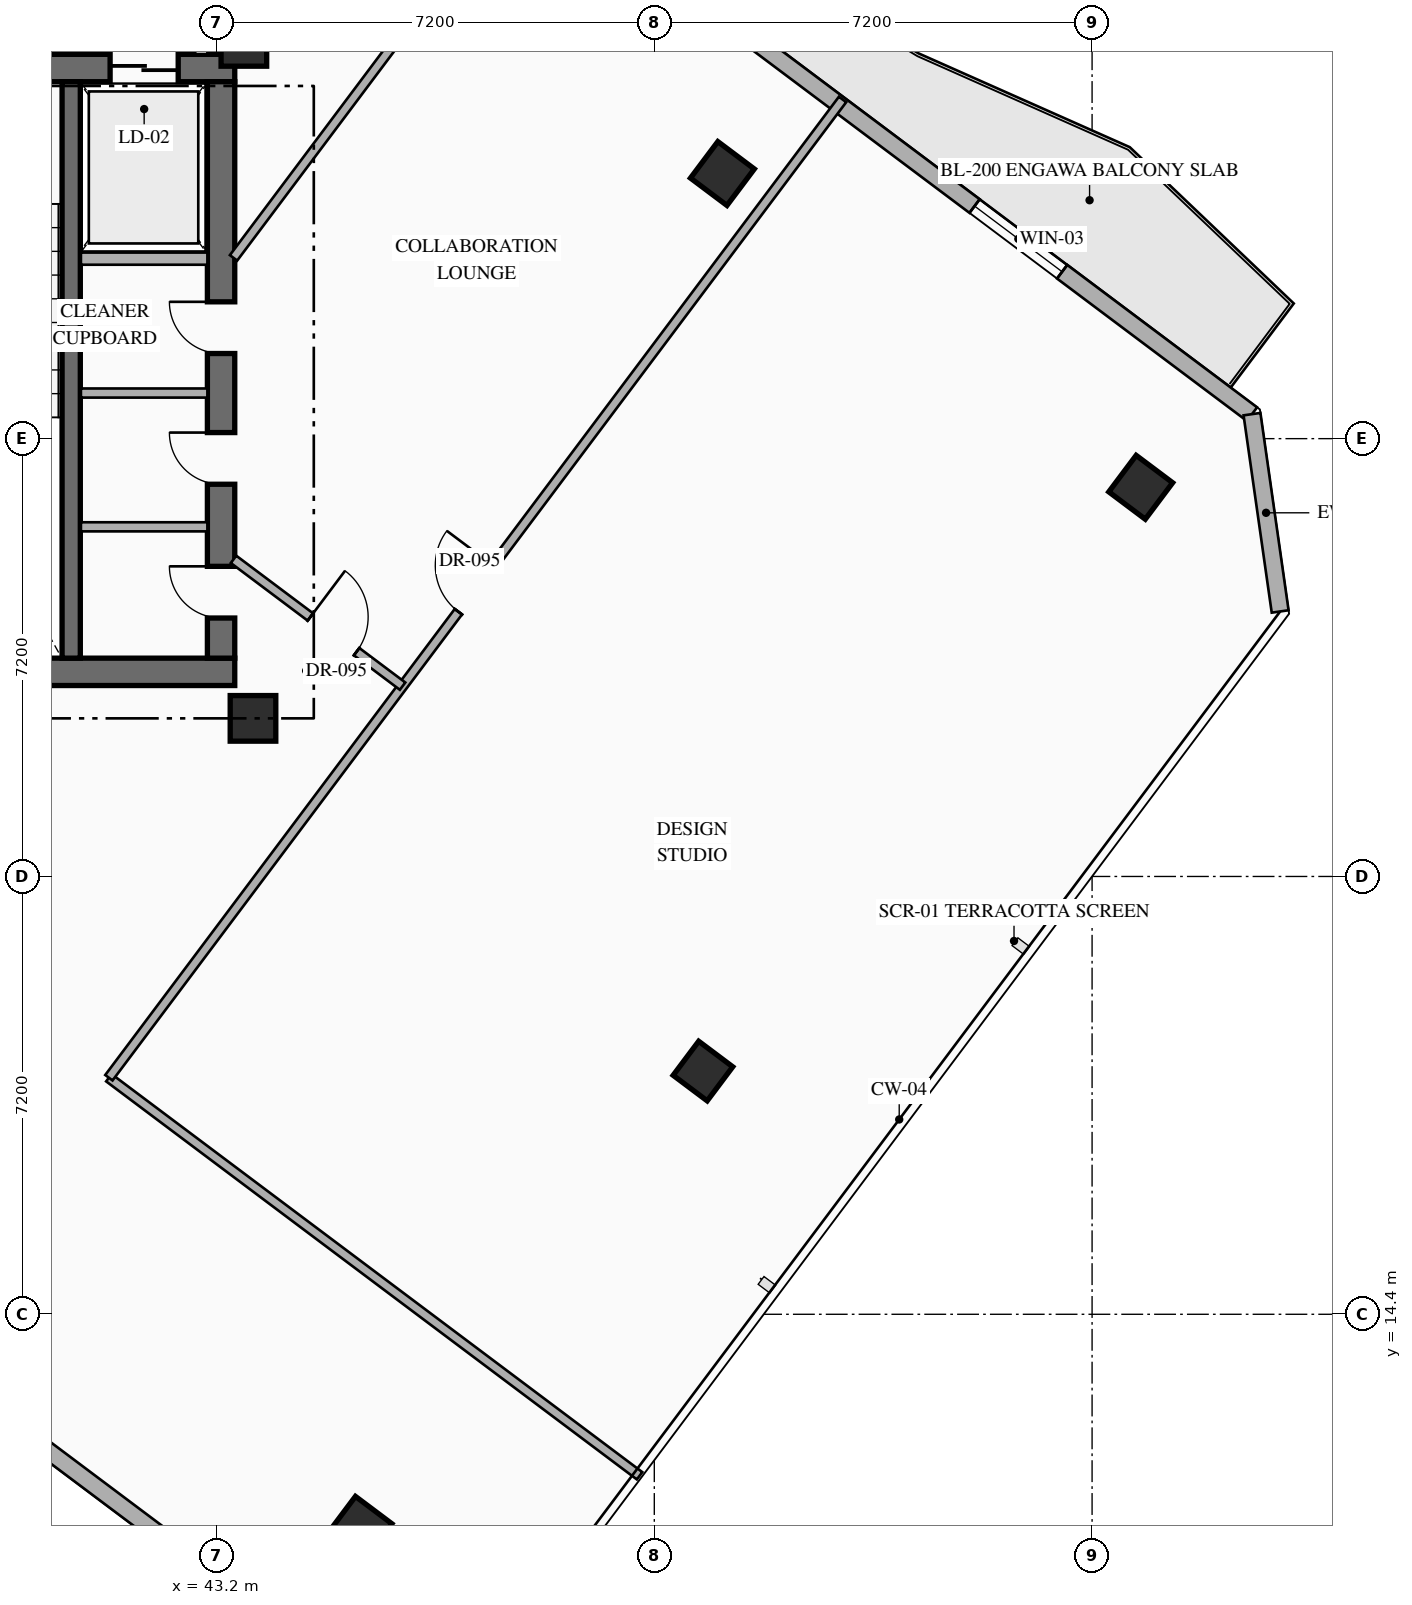
"""IFC4 building model, lengths in metres.
Left out: names, types, materials, properties, quantities, classifications, styles, units other than length and angle.
Written with IfcOpenShell. Run it as: python <this file> out.ifc"""

import sys

from ifc_helpers import new_model, si_unit, direction, frame, frame_2d, origin, origin_2d, place, context, subcontext, project, spatial, rectangle, hollow_rectangle, extrude, element, fill, save


model = new_model("IFC4")
c1 = context("Model", 3, precision=1e-05, world=origin(), true_north=direction((0.0, 1.0)))
c2 = subcontext(c1, "Body", "Model", "MODEL_VIEW")
j1 = project(units=[si_unit("LENGTHUNIT", "METRE"), si_unit("PLANEANGLEUNIT", "RADIAN")], contexts=[c1])
p1 = place(None, origin())
s1 = spatial("IfcSite", under=j1, at=p1, CompositionType="ELEMENT")
p2 = place(p1, origin())
s2 = spatial("IfcBuilding", under=s1, at=p2, CompositionType="ELEMENT")
p3 = place(p2, frame((0.0, 0.0, 205.95)))
s3 = spatial("IfcBuildingStorey", under=s2, at=p3, CompositionType="ELEMENT", Elevation=205.95)
p4 = place(p3, frame((36.04, 24.965, 0.0), z_axis=(0.0, 0.0, 1.0), x_axis=(1.0, 0.0, 0.0)))
e1 = element("IfcWall", 1, at=p4, inside=s3, PredefinedType="SHEAR", context=c2, shape_type="SweptSolid", body=[
    extrude(rectangle(XDim=7.46, YDim=0.45, at=frame_2d((3.73, 0.0))), origin(), (0.0, 0.0, 1.0), 3.6),
])
p5 = place(p3, frame((36.04, 34.895, 0.0), z_axis=(0.0, 0.0, 1.0), x_axis=(1.0, 0.0, 0.0)))
e2 = element("IfcWall", 2, at=p5, inside=s3, PredefinedType="SHEAR", context=c2, shape_type="SweptSolid", body=[
    extrude(rectangle(XDim=7.46, YDim=0.45, at=frame_2d((3.73, 0.0))), origin(), (0.0, 0.0, 1.0), 3.6),
])
p6 = place(p5, frame((2.51, 0.0, 0.0)))
e3 = element("IfcOpeningElement", 3, at=p6, cuts=e2, PredefinedType="OPENING", context=c2, shape_type="SweptSolid", body=[
    extrude(rectangle(XDim=1.1, YDim=2.2, at=frame_2d((0.55, 1.1))), frame((0.0, 0.235, 0.0), z_axis=(0.0, -1.0, 0.0), x_axis=(1.0, 0.0, 0.0)), (0.0, 0.0, 1.0), 0.47),
])
p7 = place(p5, frame((5.41, 0.0, 0.0)))
e4 = element("IfcOpeningElement", 4, at=p7, cuts=e2, PredefinedType="OPENING", context=c2, shape_type="SweptSolid", body=[
    extrude(rectangle(XDim=1.12, YDim=2.15, at=frame_2d((0.56, 1.075))), frame((0.0, 0.235, 0.0), z_axis=(0.0, -1.0, 0.0), x_axis=(1.0, 0.0, 0.0)), (0.0, 0.0, 1.0), 0.47),
])
p8 = place(p3, frame((43.275, 25.19, 0.0), z_axis=(0.0, 0.0, 1.0), x_axis=(0.0, 1.0, 0.0)))
e5 = element("IfcWall", 5, at=p8, inside=s3, PredefinedType="SHEAR", context=c2, shape_type="SweptSolid", body=[
    extrude(rectangle(XDim=9.48, YDim=0.45, at=frame_2d((4.74, 0.0))), origin(), (0.0, 0.0, 1.0), 3.6),
])
p9 = place(p8, frame((0.66, 0.0, 0.0)))
e6 = element("IfcOpeningElement", 6, at=p9, cuts=e5, PredefinedType="OPENING", context=c2, shape_type="SweptSolid", body=[
    extrude(rectangle(XDim=0.85, YDim=2.08, at=frame_2d((0.425, 1.04))), frame((0.0, 0.235, 0.0), z_axis=(0.0, -1.0, 0.0), x_axis=(1.0, 0.0, 0.0)), (0.0, 0.0, 1.0), 0.47),
])
p10 = place(p8, frame((2.86, 0.0, 0.0)))
e7 = element("IfcOpeningElement", 7, at=p10, cuts=e5, PredefinedType="OPENING", context=c2, shape_type="SweptSolid", body=[
    extrude(rectangle(XDim=0.85, YDim=2.08, at=frame_2d((0.425, 1.04))), frame((0.0, 0.235, 0.0), z_axis=(0.0, -1.0, 0.0), x_axis=(1.0, 0.0, 0.0)), (0.0, 0.0, 1.0), 0.47),
])
p11 = place(p8, frame((5.01, 0.0, 0.0)))
e8 = element("IfcOpeningElement", 8, at=p11, cuts=e5, PredefinedType="OPENING", context=c2, shape_type="SweptSolid", body=[
    extrude(rectangle(XDim=0.85, YDim=2.08, at=frame_2d((0.425, 1.04))), frame((0.0, 0.235, 0.0), z_axis=(0.0, -1.0, 0.0), x_axis=(1.0, 0.0, 0.0)), (0.0, 0.0, 1.0), 0.47),
])
p12 = place(p3, frame((40.81, 25.19, 0.0), z_axis=(0.0, 0.0, 1.0), x_axis=(0.0, 1.0, 0.0)))
e9 = element("IfcWall", 9, at=p12, inside=s3, PredefinedType="SHEAR", context=c2, shape_type="SweptSolid", body=[
    extrude(rectangle(XDim=9.48, YDim=0.3, at=frame_2d((4.74, 0.0))), origin(), (0.0, 0.0, 1.0), 3.6),
])
for number, where, z_axis, x_axis in (
    (10, (43.8, 24.2, 0.0), (0.0, 0.0, 1.0), (1.0, 0.0, 0.0)),
    (11, (43.65, 35.3, 0.0), (0.0, 0.0, 1.0), (1.0, 0.0, 0.0)),
    (12, (51.52, 33.16, 0.0), (0.0, 0.0, 1.0), (0.8, -0.6, 0.0)),
    (13, (45.56, 10.88, 0.0), (0.0, 0.0, 1.0), (0.8, -0.6, 0.0)),
    (14, (58.4, 28.0, 0.0), (0.0, 0.0, 1.0), (0.8, -0.6, 0.0)),
):
    element("IfcColumn", number, at=place(p3, frame(where, z_axis=z_axis, x_axis=x_axis)), inside=s3, PredefinedType="COLUMN", context=c2, shape_type="SweptSolid", body=[
        extrude(hollow_rectangle(XDim=0.75, YDim=0.75, WallThickness=0.028, at=origin_2d()), origin(), (0.0, 0.0, 1.0), 3.6),
    ])
p13 = place(p3, frame((51.2, 18.4, 0.0), z_axis=(0.0, 0.0, 1.0), x_axis=(0.799999996291, -0.600000004945, 0.0)))
e15 = element("IfcColumn", 15, at=p13, inside=s3, PredefinedType="COLUMN", context=c2, shape_type="SweptSolid", body=[
    extrude(hollow_rectangle(XDim=0.7, YDim=0.7, WallThickness=0.028, at=origin_2d()), origin(), (0.0, 0.0, 1.0), 3.6),
])
p14 = place(p3, frame((44.86, 40.73, 0.0), z_axis=(0.0, 0.0, 1.0), x_axis=(0.800007624502, -0.599989833863, 0.0)))
e16 = element("IfcWall", 16, at=p14, inside=s3, PredefinedType="STANDARD", context=c2, shape_type="SweptSolid", body=[
    extrude(rectangle(XDim=19.212, YDim=0.28, at=frame_2d((9.606, 0.0))), origin(), (0.0, 0.0, 1.0), 3.35),
])
p15 = place(p14, frame((1.755, 0.0, 0.0)))
e17 = element("IfcOpeningElement", 17, at=p15, cuts=e16, PredefinedType="OPENING", context=c2, shape_type="SweptSolid", body=[
    extrude(rectangle(XDim=1.1, YDim=2.2, at=frame_2d((0.55, 1.1))), frame((0.0, 0.15, 0.0), z_axis=(0.0, -1.0, 0.0), x_axis=(1.0, 0.0, 0.0)), (0.0, 0.0, 1.0), 0.3),
])
p16 = place(p14, frame((13.509, 0.0, 0.85)))
e18 = element("IfcOpeningElement", 18, at=p16, cuts=e16, PredefinedType="OPENING", context=c2, shape_type="SweptSolid", body=[
    extrude(rectangle(XDim=1.8, YDim=2.1, at=frame_2d((0.9, 1.05))), frame((0.0, 0.15, 0.0), z_axis=(0.0, -1.0, 0.0), x_axis=(1.0, 0.0, 0.0)), (0.0, 0.0, 1.0), 0.3),
])
p17 = place(p3, frame((60.23, 29.203, 0.0), z_axis=(0.0, 0.0, 1.0), x_axis=(0.141296221922, -0.989967361922, 0.0)))
e19 = element("IfcWall", 19, at=p17, inside=s3, PredefinedType="STANDARD", context=c2, shape_type="SweptSolid", body=[
    extrude(rectangle(XDim=3.278, YDim=0.28, at=frame_2d((1.639, 0.0))), origin(), (0.0, 0.0, 1.0), 3.35),
])
p18 = place(p3, frame((44.918, 8.787, 0.0), z_axis=(0.0, 0.0, 1.0), x_axis=(-0.800004765927, 0.599993645378, 0.0)))
e20 = element("IfcWall", 20, at=p18, inside=s3, PredefinedType="STANDARD", context=c2, shape_type="SweptSolid", body=[
    extrude(rectangle(XDim=24.588, YDim=0.28, at=frame_2d((12.294, 0.0))), origin(), (0.0, 0.0, 1.0), 3.35),
])
p19 = place(p3, frame((40.97, 31.76, 0.0), z_axis=(0.0, 0.0, 1.0), x_axis=(1.0, 0.0, 0.0)))
e21 = element("IfcWall", 21, at=p19, inside=s3, PredefinedType="STANDARD", context=c2, shape_type="SweptSolid", body=[
    extrude(rectangle(XDim=2.08, YDim=0.2, at=frame_2d((1.04, 0.0))), origin(), (0.0, 0.0, 1.0), 3.35),
])
for number, where, z_axis, x_axis in (
    (22, (40.97, 27.35, 0.0), (0.0, 0.0, 1.0), (1.0, 0.0, 0.0)),
    (23, (40.97, 29.55, 0.0), (0.0, 0.0, 1.0), (1.0, 0.0, 0.0)),
):
    element("IfcWall", number, at=place(p3, frame(where, z_axis=z_axis, x_axis=x_axis)), inside=s3, PredefinedType="PARTITIONING", context=c2, shape_type="SweptSolid", body=[
        extrude(rectangle(XDim=2.08, YDim=0.15, at=frame_2d((1.04, 0.0))), origin(), (0.0, 0.0, 1.0), 3.35),
    ])
p20 = place(p3, frame((42.95, 35.12, 0.0), z_axis=(0.0, 0.0, 1.0), x_axis=(0.0, 1.0, 0.0)))
e24 = element("IfcWall", 24, at=p20, inside=s3, PredefinedType="STANDARD", context=c2, shape_type="SweptSolid", body=[
    extrude(rectangle(XDim=2.98, YDim=0.2, at=frame_2d((1.49, 0.0))), origin(), (0.0, 0.0, 1.0), 3.35),
])
p21 = place(p3, frame((41.43, 18.29, 0.0), z_axis=(0.0, 0.0, 1.0), x_axis=(0.799994629375, -0.600007160767, 0.0)))
e25 = element("IfcWall", 25, at=p21, inside=s3, PredefinedType="PARTITIONING", context=c2, shape_type="SweptSolid", body=[
    extrude(rectangle(XDim=10.91, YDim=0.15, at=frame_2d((5.455, 0.0))), origin(), (0.0, 0.0, 1.0), 3.35),
])
p22 = place(p3, frame((41.43, 18.29, 0.0), z_axis=(0.0, 0.0, 1.0), x_axis=(0.600007769734, 0.79999417264, 0.0)))
e26 = element("IfcWall", 26, at=p22, inside=s3, PredefinedType="PARTITIONING", context=c2, shape_type="SweptSolid", body=[
    extrude(rectangle(XDim=20.11, YDim=0.15, at=frame_2d((10.055, 0.0))), origin(), (0.0, 0.0, 1.0), 3.35),
])
p23 = place(p22, frame((9.58, 0.0, 0.0)))
e27 = element("IfcOpeningElement", 27, at=p23, cuts=e26, PredefinedType="OPENING", context=c2, shape_type="SweptSolid", body=[
    extrude(rectangle(XDim=0.95, YDim=2.15, at=frame_2d((0.475, 1.075))), frame((0.0, 0.085, 0.0), z_axis=(0.0, -1.0, 0.0), x_axis=(1.0, 0.0, 0.0)), (0.0, 0.0, 1.0), 0.17),
])
p24 = place(p3, frame((43.48, 26.815, 0.0), z_axis=(0.0, 0.0, 1.0), x_axis=(0.800008430676, -0.599988758934, 0.0)))
e28 = element("IfcWall", 28, at=p24, inside=s3, PredefinedType="PARTITIONING", context=c2, shape_type="SweptSolid", body=[
    extrude(rectangle(XDim=3.475, YDim=0.15, at=frame_2d((1.738, 0.0))), origin(), (0.0, 0.0, 1.0), 3.35),
])
p25 = place(p24, frame((1.58, 0.0, 0.0)))
e29 = element("IfcOpeningElement", 29, at=p25, cuts=e28, PredefinedType="OPENING", context=c2, shape_type="SweptSolid", body=[
    extrude(rectangle(XDim=0.95, YDim=2.15, at=frame_2d((0.475, 1.075))), frame((0.0, 0.085, 0.0), z_axis=(0.0, -1.0, 0.0), x_axis=(1.0, 0.0, 0.0)), (0.0, 0.0, 1.0), 0.17),
])
p26 = place(p3, frame((43.48, 31.773, 0.0), z_axis=(0.0, 0.0, 1.0), x_axis=(0.599971041729, 0.800021717885, 0.0)))
e30 = element("IfcWall", 30, at=p26, inside=s3, PredefinedType="PARTITIONING", context=c2, shape_type="SweptSolid", body=[
    extrude(rectangle(XDim=8.094, YDim=0.15, at=frame_2d((4.047, 0.0))), origin(), (0.0, 0.0, 1.0), 3.35),
])
p27 = place(p16, origin())
e31 = element("IfcWindow", 31, at=p27, inside=s3, PartitioningType="SINGLE_PANEL", PredefinedType="WINDOW", context=c2, shape_type="SweptSolid", body=[
    extrude(rectangle(XDim=1.8, YDim=2.1, at=frame_2d((0.9, 1.05))), frame((0.0, 0.03, 0.0), z_axis=(0.0, -1.0, 0.0), x_axis=(1.0, 0.0, 0.0)), (0.0, 0.0, 1.0), 0.06),
])
fill(e18, e31)
p28 = place(p7, origin())
e32 = element("IfcDoor", 32, at=p28, inside=s3, OperationType="SLIDING_TO_RIGHT", PredefinedType="USERDEFINED", context=c2, shape_type="SweptSolid", body=[
    extrude(rectangle(XDim=1.12, YDim=2.15, at=frame_2d((0.56, 1.075))), frame((0.0, 0.025, 0.0), z_axis=(0.0, -1.0, 0.0), x_axis=(1.0, 0.0, 0.0)), (0.0, 0.0, 1.0), 0.05),
])
fill(e4, e32)
p29 = place(p9, origin())
e33 = element("IfcDoor", 33, at=p29, inside=s3, OperationType="SINGLE_SWING_RIGHT", PredefinedType="DOOR", context=c2, shape_type="SweptSolid", body=[
    extrude(rectangle(XDim=0.85, YDim=2.08, at=frame_2d((0.425, 1.04))), frame((0.0, 0.025, 0.0), z_axis=(0.0, -1.0, 0.0), x_axis=(1.0, 0.0, 0.0)), (0.0, 0.0, 1.0), 0.05),
])
fill(e6, e33)
p30 = place(p10, origin())
e34 = element("IfcDoor", 34, at=p30, inside=s3, OperationType="SINGLE_SWING_RIGHT", PredefinedType="DOOR", context=c2, shape_type="SweptSolid", body=[
    extrude(rectangle(XDim=0.85, YDim=2.08, at=frame_2d((0.425, 1.04))), frame((0.0, 0.025, 0.0), z_axis=(0.0, -1.0, 0.0), x_axis=(1.0, 0.0, 0.0)), (0.0, 0.0, 1.0), 0.05),
])
fill(e7, e34)
p31 = place(p11, origin())
e35 = element("IfcDoor", 35, at=p31, inside=s3, OperationType="SINGLE_SWING_RIGHT", PredefinedType="DOOR", context=c2, shape_type="SweptSolid", body=[
    extrude(rectangle(XDim=0.85, YDim=2.08, at=frame_2d((0.425, 1.04))), frame((0.0, 0.025, 0.0), z_axis=(0.0, -1.0, 0.0), x_axis=(1.0, 0.0, 0.0)), (0.0, 0.0, 1.0), 0.05),
])
fill(e8, e35)
p32 = place(p23, origin())
e36 = element("IfcDoor", 36, at=p32, inside=s3, OperationType="SINGLE_SWING_RIGHT", PredefinedType="DOOR", context=c2, shape_type="SweptSolid", body=[
    extrude(rectangle(XDim=0.95, YDim=2.15, at=frame_2d((0.475, 1.075))), frame((0.0, 0.025, 0.0), z_axis=(0.0, -1.0, 0.0), x_axis=(1.0, 0.0, 0.0)), (0.0, 0.0, 1.0), 0.05),
])
fill(e27, e36)
p33 = place(p25, origin())
e37 = element("IfcDoor", 37, at=p33, inside=s3, OperationType="SINGLE_SWING_LEFT", PredefinedType="DOOR", context=c2, shape_type="SweptSolid", body=[
    extrude(rectangle(XDim=0.95, YDim=2.15, at=frame_2d((0.475, 1.075))), frame((0.0, 0.025, 0.0), z_axis=(0.0, -1.0, 0.0), x_axis=(1.0, 0.0, 0.0)), (0.0, 0.0, 1.0), 0.05),
])
fill(e29, e37)
save(model, sys.argv[1])
